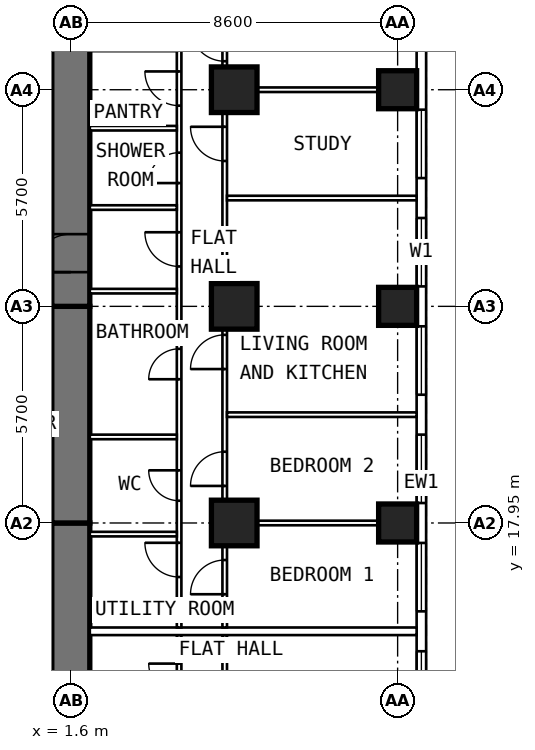
"""IFC4 building model, lengths in metres.
Left out: names, types, materials, properties, quantities, classifications, styles, units other than length and angle.
Written with IfcOpenShell. Run it as: python <this file> out.ifc"""

import sys

from ifc_helpers import new_model, si_unit, direction, frame, frame_2d, origin, origin_2d, place, context, subcontext, project, spatial, rectangle, extrude, element, fill, save


model = new_model("IFC4")
c1 = context("Model", 3, precision=1e-05, world=origin(), true_north=direction((0.0, 1.0)))
c2 = subcontext(c1, "Body", "Model", "MODEL_VIEW")
j1 = project(units=[si_unit("LENGTHUNIT", "METRE"), si_unit("PLANEANGLEUNIT", "RADIAN")], contexts=[c1])
p1 = place(None, origin())
s1 = spatial("IfcSite", under=j1, at=p1, CompositionType="ELEMENT")
p2 = place(p1, origin())
s2 = spatial("IfcBuilding", under=s1, at=p2, CompositionType="ELEMENT")
p3 = place(p2, frame((0.0, 0.0, 64.6)))
s3 = spatial("IfcBuildingStorey", under=s2, at=p3, CompositionType="ELEMENT", Elevation=64.6)
for number, where, z_axis, x_axis in (
    (1, (10.2, 17.95, 0.0), (0.0, 0.0, 1.0), (0.0, 1.0, 0.0)),
    (2, (10.2, 23.65, 0.0), (0.0, 0.0, 1.0), (0.0, 1.0, 0.0)),
    (3, (10.2, 29.35, 0.0), (0.0, 0.0, 1.0), (0.0, 1.0, 0.0)),
):
    element("IfcColumn", number, at=place(p3, frame(where, z_axis=z_axis, x_axis=x_axis)), inside=s3, PredefinedType="COLUMN", context=c2, shape_type="SweptSolid", body=[
        extrude(rectangle(XDim=1.0, YDim=1.0, at=origin_2d()), origin(), (0.0, 0.0, 1.0), 3.6),
    ])
for number, where, z_axis, x_axis in (
    (4, (5.9, 17.95, 0.0), (0.0, 0.0, 1.0), (0.0, 1.0, 0.0)),
    (5, (5.9, 23.65, 0.0), (0.0, 0.0, 1.0), (0.0, 1.0, 0.0)),
    (6, (5.9, 29.35, 0.0), (0.0, 0.0, 1.0), (0.0, 1.0, 0.0)),
):
    element("IfcColumn", number, at=place(p3, frame(where, z_axis=z_axis, x_axis=x_axis)), inside=s3, PredefinedType="COLUMN", context=c2, shape_type="SweptSolid", body=[
        extrude(rectangle(XDim=1.2, YDim=1.2, at=origin_2d()), origin(), (0.0, 0.0, 1.0), 3.6),
    ])
p4 = place(p3, frame((1.6, 9.6, 0.0), z_axis=(0.0, 0.0, 1.0), x_axis=(0.0, 1.0, 0.0)))
e7 = element("IfcWall", 7, at=p4, inside=s3, PredefinedType="SHEAR", context=c2, shape_type="SweptSolid", body=[
    extrude(rectangle(XDim=8.35, YDim=1.0, at=frame_2d((4.175, 0.0))), origin(), (0.0, 0.0, 1.0), 3.6),
])
p5 = place(p4, frame((1.3, 0.0, 0.0)))
e8 = element("IfcOpeningElement", 8, at=p5, cuts=e7, PredefinedType="OPENING", context=c2, shape_type="SweptSolid", body=[
    extrude(rectangle(XDim=1.0, YDim=2.1, at=frame_2d((0.5, 1.05))), frame((0.0, 0.512, 0.0), z_axis=(0.0, -1.0, 0.0), x_axis=(1.0, 0.0, 0.0)), (0.0, 0.0, 1.0), 1.024),
])
p6 = place(p3, frame((1.6, 17.95, 0.0), z_axis=(0.0, 0.0, 1.0), x_axis=(0.0, 1.0, 0.0)))
e9 = element("IfcWall", 9, at=p6, inside=s3, PredefinedType="SHEAR", context=c2, shape_type="SweptSolid", body=[
    extrude(rectangle(XDim=5.7, YDim=1.0, at=frame_2d((2.85, 0.0))), origin(), (0.0, 0.0, 1.0), 3.6),
])
p7 = place(p3, frame((1.6, 23.65, 0.0), z_axis=(0.0, 0.0, 1.0), x_axis=(0.0, 1.0, 0.0)))
e10 = element("IfcWall", 10, at=p7, inside=s3, PredefinedType="SHEAR", context=c2, shape_type="SweptSolid", body=[
    extrude(rectangle(XDim=10.745, YDim=1.0, at=frame_2d((5.373, 0.0))), origin(), (0.0, 0.0, 1.0), 3.6),
])
p8 = place(p7, frame((0.9, 0.0, 0.0)))
e11 = element("IfcOpeningElement", 11, at=p8, cuts=e10, PredefinedType="OPENING", context=c2, shape_type="SweptSolid", body=[
    extrude(rectangle(XDim=1.0, YDim=2.1, at=frame_2d((0.5, 1.05))), frame((0.0, 0.512, 0.0), z_axis=(0.0, -1.0, 0.0), x_axis=(1.0, 0.0, 0.0)), (0.0, 0.0, 1.0), 1.024),
])
p9 = place(p3, frame((10.825, 6.394, 0.0), z_axis=(0.0, 0.0, 1.0), x_axis=(0.0, 1.0, 0.0)))
e12 = element("IfcWall", 12, at=p9, inside=s3, PredefinedType="SOLIDWALL", context=c2, shape_type="SweptSolid", body=[
    extrude(rectangle(XDim=25.241, YDim=0.25, at=frame_2d((12.621, 0.0))), origin(), (0.0, 0.0, 1.0), 3.35),
])
p10 = place(p9, frame((0.681, 0.0, 0.8)))
e13 = element("IfcOpeningElement", 13, at=p10, cuts=e12, PredefinedType="OPENING", context=c2, shape_type="SweptSolid", body=[
    extrude(rectangle(XDim=1.8, YDim=1.8, at=frame_2d((0.9, 0.9))), frame((0.0, 0.137, 0.0), z_axis=(0.0, -1.0, 0.0), x_axis=(1.0, 0.0, 0.0)), (0.0, 0.0, 1.0), 0.274),
])
p11 = place(p9, frame((3.531, 0.0, 0.8)))
e14 = element("IfcOpeningElement", 14, at=p11, cuts=e12, PredefinedType="OPENING", context=c2, shape_type="SweptSolid", body=[
    extrude(rectangle(XDim=1.8, YDim=1.8, at=frame_2d((0.9, 0.9))), frame((0.0, 0.137, 0.0), z_axis=(0.0, -1.0, 0.0), x_axis=(1.0, 0.0, 0.0)), (0.0, 0.0, 1.0), 0.274),
])
p12 = place(p9, frame((6.381, 0.0, 0.8)))
e15 = element("IfcOpeningElement", 15, at=p12, cuts=e12, PredefinedType="OPENING", context=c2, shape_type="SweptSolid", body=[
    extrude(rectangle(XDim=1.8, YDim=1.8, at=frame_2d((0.9, 0.9))), frame((0.0, 0.137, 0.0), z_axis=(0.0, -1.0, 0.0), x_axis=(1.0, 0.0, 0.0)), (0.0, 0.0, 1.0), 0.274),
])
p13 = place(p9, frame((9.231, 0.0, 0.8)))
e16 = element("IfcOpeningElement", 16, at=p13, cuts=e12, PredefinedType="OPENING", context=c2, shape_type="SweptSolid", body=[
    extrude(rectangle(XDim=1.8, YDim=1.8, at=frame_2d((0.9, 0.9))), frame((0.0, 0.137, 0.0), z_axis=(0.0, -1.0, 0.0), x_axis=(1.0, 0.0, 0.0)), (0.0, 0.0, 1.0), 0.274),
])
p14 = place(p9, frame((12.081, 0.0, 0.8)))
e17 = element("IfcOpeningElement", 17, at=p14, cuts=e12, PredefinedType="OPENING", context=c2, shape_type="SweptSolid", body=[
    extrude(rectangle(XDim=1.8, YDim=1.8, at=frame_2d((0.9, 0.9))), frame((0.0, 0.137, 0.0), z_axis=(0.0, -1.0, 0.0), x_axis=(1.0, 0.0, 0.0)), (0.0, 0.0, 1.0), 0.274),
])
p15 = place(p9, frame((14.931, 0.0, 0.8)))
e18 = element("IfcOpeningElement", 18, at=p15, cuts=e12, PredefinedType="OPENING", context=c2, shape_type="SweptSolid", body=[
    extrude(rectangle(XDim=1.8, YDim=1.8, at=frame_2d((0.9, 0.9))), frame((0.0, 0.137, 0.0), z_axis=(0.0, -1.0, 0.0), x_axis=(1.0, 0.0, 0.0)), (0.0, 0.0, 1.0), 0.274),
])
p16 = place(p9, frame((17.781, 0.0, 0.8)))
e19 = element("IfcOpeningElement", 19, at=p16, cuts=e12, PredefinedType="OPENING", context=c2, shape_type="SweptSolid", body=[
    extrude(rectangle(XDim=1.8, YDim=1.8, at=frame_2d((0.9, 0.9))), frame((0.0, 0.137, 0.0), z_axis=(0.0, -1.0, 0.0), x_axis=(1.0, 0.0, 0.0)), (0.0, 0.0, 1.0), 0.274),
])
p17 = place(p9, frame((20.631, 0.0, 0.8)))
e20 = element("IfcOpeningElement", 20, at=p17, cuts=e12, PredefinedType="OPENING", context=c2, shape_type="SweptSolid", body=[
    extrude(rectangle(XDim=1.8, YDim=1.8, at=frame_2d((0.9, 0.9))), frame((0.0, 0.137, 0.0), z_axis=(0.0, -1.0, 0.0), x_axis=(1.0, 0.0, 0.0)), (0.0, 0.0, 1.0), 0.274),
])
p18 = place(p3, frame((4.45, 10.1, 0.0), z_axis=(0.0, 0.0, 1.0), x_axis=(0.0, 1.0, 0.0)))
e21 = element("IfcWall", 21, at=p18, inside=s3, PredefinedType="PARTITIONING", context=c2, shape_type="SweptSolid", body=[
    extrude(rectangle(XDim=4.9, YDim=0.12, at=frame_2d((2.45, 0.0))), origin(), (0.0, 0.0, 1.0), 3.35),
])
p19 = place(p18, frame((0.75, 0.0, 0.0)))
e22 = element("IfcOpeningElement", 22, at=p19, cuts=e21, PredefinedType="OPENING", context=c2, shape_type="SweptSolid", body=[
    extrude(rectangle(XDim=0.9, YDim=2.1, at=frame_2d((0.45, 1.05))), frame((0.0, 0.072, 0.0), z_axis=(0.0, -1.0, 0.0), x_axis=(1.0, 0.0, 0.0)), (0.0, 0.0, 1.0), 0.144),
])
p20 = place(p18, frame((3.35, 0.0, 0.0)))
e23 = element("IfcOpeningElement", 23, at=p20, cuts=e21, PredefinedType="OPENING", context=c2, shape_type="SweptSolid", body=[
    extrude(rectangle(XDim=0.8, YDim=2.1, at=frame_2d((0.4, 1.05))), frame((0.0, 0.072, 0.0), z_axis=(0.0, -1.0, 0.0), x_axis=(1.0, 0.0, 0.0)), (0.0, 0.0, 1.0), 0.144),
])
p21 = place(p3, frame((5.65, 9.6, 0.0), z_axis=(0.0, 0.0, 1.0), x_axis=(0.0, 1.0, 0.0)))
e24 = element("IfcWall", 24, at=p21, inside=s3, PredefinedType="PARTITIONING", context=c2, shape_type="SweptSolid", body=[
    extrude(rectangle(XDim=5.4, YDim=0.12, at=frame_2d((2.7, 0.0))), origin(), (0.0, 0.0, 1.0), 3.35),
])
p22 = place(p21, frame((3.4, 0.0, 0.0)))
e25 = element("IfcOpeningElement", 25, at=p22, cuts=e24, PredefinedType="OPENING", context=c2, shape_type="SweptSolid", body=[
    extrude(rectangle(XDim=0.9, YDim=2.1, at=frame_2d((0.45, 1.05))), frame((0.0, 0.072, 0.0), z_axis=(0.0, -1.0, 0.0), x_axis=(1.0, 0.0, 0.0)), (0.0, 0.0, 1.0), 0.144),
])
p23 = place(p3, frame((4.45, 15.2, 0.0), z_axis=(0.0, 0.0, 1.0), x_axis=(0.0, 1.0, 0.0)))
e26 = element("IfcWall", 26, at=p23, inside=s3, PredefinedType="PARTITIONING", context=c2, shape_type="SweptSolid", body=[
    extrude(rectangle(XDim=19.195, YDim=0.12, at=frame_2d((9.598, 0.0))), origin(), (0.0, 0.0, 1.0), 3.35),
])
p24 = place(p23, frame((1.329, 0.0, 0.0)))
e27 = element("IfcOpeningElement", 27, at=p24, cuts=e26, PredefinedType="OPENING", context=c2, shape_type="SweptSolid", body=[
    extrude(rectangle(XDim=0.9, YDim=2.1, at=frame_2d((0.45, 1.05))), frame((0.0, 0.072, 0.0), z_axis=(0.0, -1.0, 0.0), x_axis=(1.0, 0.0, 0.0)), (0.0, 0.0, 1.0), 0.144),
])
p25 = place(p23, frame((3.336, 0.0, 0.0)))
e28 = element("IfcOpeningElement", 28, at=p25, cuts=e26, PredefinedType="OPENING", context=c2, shape_type="SweptSolid", body=[
    extrude(rectangle(XDim=0.8, YDim=2.1, at=frame_2d((0.4, 1.05))), frame((0.0, 0.072, 0.0), z_axis=(0.0, -1.0, 0.0), x_axis=(1.0, 0.0, 0.0)), (0.0, 0.0, 1.0), 0.144),
])
p26 = place(p23, frame((6.532, 0.0, 0.0)))
e29 = element("IfcOpeningElement", 29, at=p26, cuts=e26, PredefinedType="OPENING", context=c2, shape_type="SweptSolid", body=[
    extrude(rectangle(XDim=0.8, YDim=2.1, at=frame_2d((0.4, 1.05))), frame((0.0, 0.072, 0.0), z_axis=(0.0, -1.0, 0.0), x_axis=(1.0, 0.0, 0.0)), (0.0, 0.0, 1.0), 0.144),
])
p27 = place(p23, frame((9.5, 0.0, 0.0)))
e30 = element("IfcOpeningElement", 30, at=p27, cuts=e26, PredefinedType="OPENING", context=c2, shape_type="SweptSolid", body=[
    extrude(rectangle(XDim=0.9, YDim=2.1, at=frame_2d((0.45, 1.05))), frame((0.0, 0.072, 0.0), z_axis=(0.0, -1.0, 0.0), x_axis=(1.0, 0.0, 0.0)), (0.0, 0.0, 1.0), 0.144),
])
p28 = place(p23, frame((11.694, 0.0, 0.0)))
e31 = element("IfcOpeningElement", 31, at=p28, cuts=e26, PredefinedType="OPENING", context=c2, shape_type="SweptSolid", body=[
    extrude(rectangle(XDim=0.8, YDim=2.1, at=frame_2d((0.4, 1.05))), frame((0.0, 0.072, 0.0), z_axis=(0.0, -1.0, 0.0), x_axis=(1.0, 0.0, 0.0)), (0.0, 0.0, 1.0), 0.144),
])
p29 = place(p23, frame((13.731, 0.0, 0.0)))
e32 = element("IfcOpeningElement", 32, at=p29, cuts=e26, PredefinedType="OPENING", context=c2, shape_type="SweptSolid", body=[
    extrude(rectangle(XDim=0.9, YDim=2.1, at=frame_2d((0.45, 1.05))), frame((0.0, 0.072, 0.0), z_axis=(0.0, -1.0, 0.0), x_axis=(1.0, 0.0, 0.0)), (0.0, 0.0, 1.0), 0.144),
])
p30 = place(p23, frame((15.869, 0.0, 0.0)))
e33 = element("IfcOpeningElement", 33, at=p30, cuts=e26, PredefinedType="OPENING", context=c2, shape_type="SweptSolid", body=[
    extrude(rectangle(XDim=0.8, YDim=2.1, at=frame_2d((0.4, 1.05))), frame((0.0, 0.072, 0.0), z_axis=(0.0, -1.0, 0.0), x_axis=(1.0, 0.0, 0.0)), (0.0, 0.0, 1.0), 0.144),
])
p31 = place(p23, frame((17.472, 0.0, 0.0)))
e34 = element("IfcOpeningElement", 34, at=p31, cuts=e26, PredefinedType="OPENING", context=c2, shape_type="SweptSolid", body=[
    extrude(rectangle(XDim=0.9, YDim=2.1, at=frame_2d((0.45, 1.05))), frame((0.0, 0.072, 0.0), z_axis=(0.0, -1.0, 0.0), x_axis=(1.0, 0.0, 0.0)), (0.0, 0.0, 1.0), 0.144),
])
p32 = place(p3, frame((5.65, 15.2, 0.0), z_axis=(0.0, 0.0, 1.0), x_axis=(0.0, 1.0, 0.0)))
e35 = element("IfcWall", 35, at=p32, inside=s3, PredefinedType="PARTITIONING", context=c2, shape_type="SweptSolid", body=[
    extrude(rectangle(XDim=19.195, YDim=0.12, at=frame_2d((9.598, 0.0))), origin(), (0.0, 0.0, 1.0), 3.35),
])
p33 = place(p32, frame((0.875, 0.0, 0.0)))
e36 = element("IfcOpeningElement", 36, at=p33, cuts=e35, PredefinedType="OPENING", context=c2, shape_type="SweptSolid", body=[
    extrude(rectangle(XDim=0.9, YDim=2.1, at=frame_2d((0.45, 1.05))), frame((0.0, 0.072, 0.0), z_axis=(0.0, -1.0, 0.0), x_axis=(1.0, 0.0, 0.0)), (0.0, 0.0, 1.0), 0.144),
])
p34 = place(p32, frame((3.725, 0.0, 0.0)))
e37 = element("IfcOpeningElement", 37, at=p34, cuts=e35, PredefinedType="OPENING", context=c2, shape_type="SweptSolid", body=[
    extrude(rectangle(XDim=0.9, YDim=2.1, at=frame_2d((0.45, 1.05))), frame((0.0, 0.072, 0.0), z_axis=(0.0, -1.0, 0.0), x_axis=(1.0, 0.0, 0.0)), (0.0, 0.0, 1.0), 0.144),
])
p35 = place(p32, frame((6.8, 0.0, 0.0)))
e38 = element("IfcOpeningElement", 38, at=p35, cuts=e35, PredefinedType="OPENING", context=c2, shape_type="SweptSolid", body=[
    extrude(rectangle(XDim=0.9, YDim=2.1, at=frame_2d((0.45, 1.05))), frame((0.0, 0.072, 0.0), z_axis=(0.0, -1.0, 0.0), x_axis=(1.0, 0.0, 0.0)), (0.0, 0.0, 1.0), 0.144),
])
p36 = place(p32, frame((12.275, 0.0, 0.0)))
e39 = element("IfcOpeningElement", 39, at=p36, cuts=e35, PredefinedType="OPENING", context=c2, shape_type="SweptSolid", body=[
    extrude(rectangle(XDim=0.9, YDim=2.1, at=frame_2d((0.45, 1.05))), frame((0.0, 0.072, 0.0), z_axis=(0.0, -1.0, 0.0), x_axis=(1.0, 0.0, 0.0)), (0.0, 0.0, 1.0), 0.144),
])
p37 = place(p32, frame((14.9, 0.0, 0.0)))
e40 = element("IfcOpeningElement", 40, at=p37, cuts=e35, PredefinedType="OPENING", context=c2, shape_type="SweptSolid", body=[
    extrude(rectangle(XDim=0.9, YDim=2.1, at=frame_2d((0.45, 1.05))), frame((0.0, 0.072, 0.0), z_axis=(0.0, -1.0, 0.0), x_axis=(1.0, 0.0, 0.0)), (0.0, 0.0, 1.0), 0.144),
])
p38 = place(p3, frame((5.71, 17.95, 0.0), z_axis=(0.0, 0.0, 1.0), x_axis=(1.0, 0.0, 0.0)))
e41 = element("IfcWall", 41, at=p38, inside=s3, PredefinedType="PARTITIONING", context=c2, shape_type="SweptSolid", body=[
    extrude(rectangle(XDim=4.99, YDim=0.12, at=frame_2d((2.495, 0.0))), origin(), (0.0, 0.0, 1.0), 2.45),
])
for number, where, z_axis, x_axis in (
    (42, (5.71, 20.8, 0.0), (0.0, 0.0, 1.0), (1.0, 0.0, 0.0)),
    (43, (5.71, 26.5, 0.0), (0.0, 0.0, 1.0), (1.0, 0.0, 0.0)),
):
    element("IfcWall", number, at=place(p3, frame(where, z_axis=z_axis, x_axis=x_axis)), inside=s3, PredefinedType="PARTITIONING", context=c2, shape_type="SweptSolid", body=[
        extrude(rectangle(XDim=4.99, YDim=0.12, at=frame_2d((2.495, 0.0))), origin(), (0.0, 0.0, 1.0), 3.35),
    ])
p39 = place(p3, frame((5.71, 29.35, 0.0), z_axis=(0.0, 0.0, 1.0), x_axis=(1.0, 0.0, 0.0)))
e44 = element("IfcWall", 44, at=p39, inside=s3, PredefinedType="PARTITIONING", context=c2, shape_type="SweptSolid", body=[
    extrude(rectangle(XDim=4.99, YDim=0.12, at=frame_2d((2.495, 0.0))), origin(), (0.0, 0.0, 1.0), 2.45),
])
p40 = place(p3, frame((2.1, 17.657, 0.0), z_axis=(0.0, 0.0, 1.0), x_axis=(1.0, 0.0, 0.0)))
e45 = element("IfcWall", 45, at=p40, inside=s3, PredefinedType="PARTITIONING", context=c2, shape_type="SweptSolid", body=[
    extrude(rectangle(XDim=2.29, YDim=0.12, at=frame_2d((1.145, 0.0))), origin(), (0.0, 0.0, 1.0), 2.45),
])
for number, where, z_axis, x_axis in (
    (46, (2.1, 20.214, 0.0), (0.0, 0.0, 1.0), (1.0, 0.0, 0.0)),
    (47, (2.1, 24.05, 0.0), (0.0, 0.0, 1.0), (1.0, 0.0, 0.0)),
    (48, (2.1, 26.25, 0.0), (0.0, 0.0, 1.0), (1.0, 0.0, 0.0)),
    (49, (2.1, 28.337, 0.0), (0.0, 0.0, 1.0), (1.0, 0.0, 0.0)),
):
    element("IfcWall", number, at=place(p3, frame(where, z_axis=z_axis, x_axis=x_axis)), inside=s3, PredefinedType="PARTITIONING", context=c2, shape_type="SweptSolid", body=[
        extrude(rectangle(XDim=2.29, YDim=0.12, at=frame_2d((1.145, 0.0))), origin(), (0.0, 0.0, 1.0), 3.35),
    ])
p41 = place(p3, frame((2.1, 15.1, 0.0), z_axis=(0.0, 0.0, 1.0), x_axis=(1.0, 0.0, 0.0)))
e50 = element("IfcWall", 50, at=p41, inside=s3, PredefinedType="PARTITIONING", context=c2, shape_type="SweptSolid", body=[
    extrude(rectangle(XDim=8.6, YDim=0.2, at=frame_2d((4.3, 0.0))), origin(), (0.0, 0.0, 1.0), 3.35),
])
p42 = place(p12, origin())
e51 = element("IfcWindow", 51, at=p42, inside=s3, PartitioningType="SINGLE_PANEL", PredefinedType="WINDOW", context=c2, shape_type="SweptSolid", body=[
    extrude(rectangle(XDim=1.8, YDim=1.8, at=frame_2d((0.9, 0.9))), frame((0.0, 0.03, 0.0), z_axis=(0.0, -1.0, 0.0), x_axis=(1.0, 0.0, 0.0)), (0.0, 0.0, 1.0), 0.06),
])
fill(e15, e51)
p43 = place(p13, origin())
e52 = element("IfcWindow", 52, at=p43, inside=s3, PartitioningType="SINGLE_PANEL", PredefinedType="WINDOW", context=c2, shape_type="SweptSolid", body=[
    extrude(rectangle(XDim=1.8, YDim=1.8, at=frame_2d((0.9, 0.9))), frame((0.0, 0.03, 0.0), z_axis=(0.0, -1.0, 0.0), x_axis=(1.0, 0.0, 0.0)), (0.0, 0.0, 1.0), 0.06),
])
fill(e16, e52)
p44 = place(p14, origin())
e53 = element("IfcWindow", 53, at=p44, inside=s3, PartitioningType="SINGLE_PANEL", PredefinedType="WINDOW", context=c2, shape_type="SweptSolid", body=[
    extrude(rectangle(XDim=1.8, YDim=1.8, at=frame_2d((0.9, 0.9))), frame((0.0, 0.03, 0.0), z_axis=(0.0, -1.0, 0.0), x_axis=(1.0, 0.0, 0.0)), (0.0, 0.0, 1.0), 0.06),
])
fill(e17, e53)
p45 = place(p15, origin())
e54 = element("IfcWindow", 54, at=p45, inside=s3, PartitioningType="SINGLE_PANEL", PredefinedType="WINDOW", context=c2, shape_type="SweptSolid", body=[
    extrude(rectangle(XDim=1.8, YDim=1.8, at=frame_2d((0.9, 0.9))), frame((0.0, 0.03, 0.0), z_axis=(0.0, -1.0, 0.0), x_axis=(1.0, 0.0, 0.0)), (0.0, 0.0, 1.0), 0.06),
])
fill(e18, e54)
p46 = place(p16, origin())
e55 = element("IfcWindow", 55, at=p46, inside=s3, PartitioningType="SINGLE_PANEL", PredefinedType="WINDOW", context=c2, shape_type="SweptSolid", body=[
    extrude(rectangle(XDim=1.8, YDim=1.8, at=frame_2d((0.9, 0.9))), frame((0.0, 0.03, 0.0), z_axis=(0.0, -1.0, 0.0), x_axis=(1.0, 0.0, 0.0)), (0.0, 0.0, 1.0), 0.06),
])
fill(e19, e55)
p47 = place(p17, origin())
e56 = element("IfcWindow", 56, at=p47, inside=s3, PartitioningType="SINGLE_PANEL", PredefinedType="WINDOW", context=c2, shape_type="SweptSolid", body=[
    extrude(rectangle(XDim=1.8, YDim=1.8, at=frame_2d((0.9, 0.9))), frame((0.0, 0.03, 0.0), z_axis=(0.0, -1.0, 0.0), x_axis=(1.0, 0.0, 0.0)), (0.0, 0.0, 1.0), 0.06),
])
fill(e20, e56)
p48 = place(p20, origin())
e57 = element("IfcDoor", 57, at=p48, inside=s3, OperationType="SINGLE_SWING_RIGHT", PredefinedType="DOOR", context=c2, shape_type="SweptSolid", body=[
    extrude(rectangle(XDim=0.8, YDim=2.1, at=frame_2d((0.4, 1.05))), frame((0.0, 0.025, 0.0), z_axis=(0.0, -1.0, 0.0), x_axis=(1.0, 0.0, 0.0)), (0.0, 0.0, 1.0), 0.05),
])
fill(e23, e57)
p49 = place(p8, origin())
e58 = element("IfcDoor", 58, at=p49, inside=s3, OperationType="SINGLE_SWING_LEFT", PredefinedType="DOOR", context=c2, shape_type="SweptSolid", body=[
    extrude(rectangle(XDim=1.0, YDim=2.1, at=frame_2d((0.5, 1.05))), frame((0.0, 0.25, 0.0), z_axis=(0.0, -1.0, 0.0), x_axis=(1.0, 0.0, 0.0)), (0.0, 0.0, 1.0), 0.5),
])
fill(e11, e58)
p50 = place(p33, origin())
e59 = element("IfcDoor", 59, at=p50, inside=s3, OperationType="SINGLE_SWING_LEFT", PredefinedType="DOOR", context=c2, shape_type="SweptSolid", body=[
    extrude(rectangle(XDim=0.9, YDim=2.1, at=frame_2d((0.45, 1.05))), frame((0.0, 0.025, 0.0), z_axis=(0.0, -1.0, 0.0), x_axis=(1.0, 0.0, 0.0)), (0.0, 0.0, 1.0), 0.05),
])
fill(e36, e59)
p51 = place(p34, origin())
e60 = element("IfcDoor", 60, at=p51, inside=s3, OperationType="SINGLE_SWING_LEFT", PredefinedType="DOOR", context=c2, shape_type="SweptSolid", body=[
    extrude(rectangle(XDim=0.9, YDim=2.1, at=frame_2d((0.45, 1.05))), frame((0.0, 0.025, 0.0), z_axis=(0.0, -1.0, 0.0), x_axis=(1.0, 0.0, 0.0)), (0.0, 0.0, 1.0), 0.05),
])
fill(e37, e60)
p52 = place(p35, origin())
e61 = element("IfcDoor", 61, at=p52, inside=s3, OperationType="SINGLE_SWING_LEFT", PredefinedType="DOOR", context=c2, shape_type="SweptSolid", body=[
    extrude(rectangle(XDim=0.9, YDim=2.1, at=frame_2d((0.45, 1.05))), frame((0.0, 0.025, 0.0), z_axis=(0.0, -1.0, 0.0), x_axis=(1.0, 0.0, 0.0)), (0.0, 0.0, 1.0), 0.05),
])
fill(e38, e61)
p53 = place(p36, origin())
e62 = element("IfcDoor", 62, at=p53, inside=s3, OperationType="SINGLE_SWING_RIGHT", PredefinedType="DOOR", context=c2, shape_type="SweptSolid", body=[
    extrude(rectangle(XDim=0.9, YDim=2.1, at=frame_2d((0.45, 1.05))), frame((0.0, 0.025, 0.0), z_axis=(0.0, -1.0, 0.0), x_axis=(1.0, 0.0, 0.0)), (0.0, 0.0, 1.0), 0.05),
])
fill(e39, e62)
p54 = place(p37, origin())
e63 = element("IfcDoor", 63, at=p54, inside=s3, OperationType="SINGLE_SWING_RIGHT", PredefinedType="DOOR", context=c2, shape_type="SweptSolid", body=[
    extrude(rectangle(XDim=0.9, YDim=2.1, at=frame_2d((0.45, 1.05))), frame((0.0, 0.025, 0.0), z_axis=(0.0, -1.0, 0.0), x_axis=(1.0, 0.0, 0.0)), (0.0, 0.0, 1.0), 0.05),
])
fill(e40, e63)
p55 = place(p24, origin())
e64 = element("IfcDoor", 64, at=p55, inside=s3, OperationType="SINGLE_SWING_RIGHT", PredefinedType="DOOR", context=c2, shape_type="SweptSolid", body=[
    extrude(rectangle(XDim=0.9, YDim=2.1, at=frame_2d((0.45, 1.05))), frame((0.0, 0.025, 0.0), z_axis=(0.0, -1.0, 0.0), x_axis=(1.0, 0.0, 0.0)), (0.0, 0.0, 1.0), 0.05),
])
fill(e27, e64)
p56 = place(p25, origin())
e65 = element("IfcDoor", 65, at=p56, inside=s3, OperationType="SINGLE_SWING_RIGHT", PredefinedType="DOOR", context=c2, shape_type="SweptSolid", body=[
    extrude(rectangle(XDim=0.8, YDim=2.1, at=frame_2d((0.4, 1.05))), frame((0.0, 0.025, 0.0), z_axis=(0.0, -1.0, 0.0), x_axis=(1.0, 0.0, 0.0)), (0.0, 0.0, 1.0), 0.05),
])
fill(e28, e65)
p57 = place(p26, origin())
e66 = element("IfcDoor", 66, at=p57, inside=s3, OperationType="SINGLE_SWING_LEFT", PredefinedType="DOOR", context=c2, shape_type="SweptSolid", body=[
    extrude(rectangle(XDim=0.8, YDim=2.1, at=frame_2d((0.4, 1.05))), frame((0.0, 0.025, 0.0), z_axis=(0.0, -1.0, 0.0), x_axis=(1.0, 0.0, 0.0)), (0.0, 0.0, 1.0), 0.05),
])
fill(e29, e66)
p58 = place(p27, origin())
e67 = element("IfcDoor", 67, at=p58, inside=s3, OperationType="SINGLE_SWING_RIGHT", PredefinedType="DOOR", context=c2, shape_type="SweptSolid", body=[
    extrude(rectangle(XDim=0.9, YDim=2.1, at=frame_2d((0.45, 1.05))), frame((0.0, 0.025, 0.0), z_axis=(0.0, -1.0, 0.0), x_axis=(1.0, 0.0, 0.0)), (0.0, 0.0, 1.0), 0.05),
])
fill(e30, e67)
p59 = place(p28, origin())
e68 = element("IfcDoor", 68, at=p59, inside=s3, OperationType="SINGLE_SWING_LEFT", PredefinedType="DOOR", context=c2, shape_type="SweptSolid", body=[
    extrude(rectangle(XDim=0.8, YDim=2.1, at=frame_2d((0.4, 1.05))), frame((0.0, 0.025, 0.0), z_axis=(0.0, -1.0, 0.0), x_axis=(1.0, 0.0, 0.0)), (0.0, 0.0, 1.0), 0.05),
])
fill(e31, e68)
p60 = place(p29, origin())
e69 = element("IfcDoor", 69, at=p60, inside=s3, OperationType="SINGLE_SWING_RIGHT", PredefinedType="DOOR", context=c2, shape_type="SweptSolid", body=[
    extrude(rectangle(XDim=0.9, YDim=2.1, at=frame_2d((0.45, 1.05))), frame((0.0, 0.025, 0.0), z_axis=(0.0, -1.0, 0.0), x_axis=(1.0, 0.0, 0.0)), (0.0, 0.0, 1.0), 0.05),
])
fill(e32, e69)
save(model, sys.argv[1])
